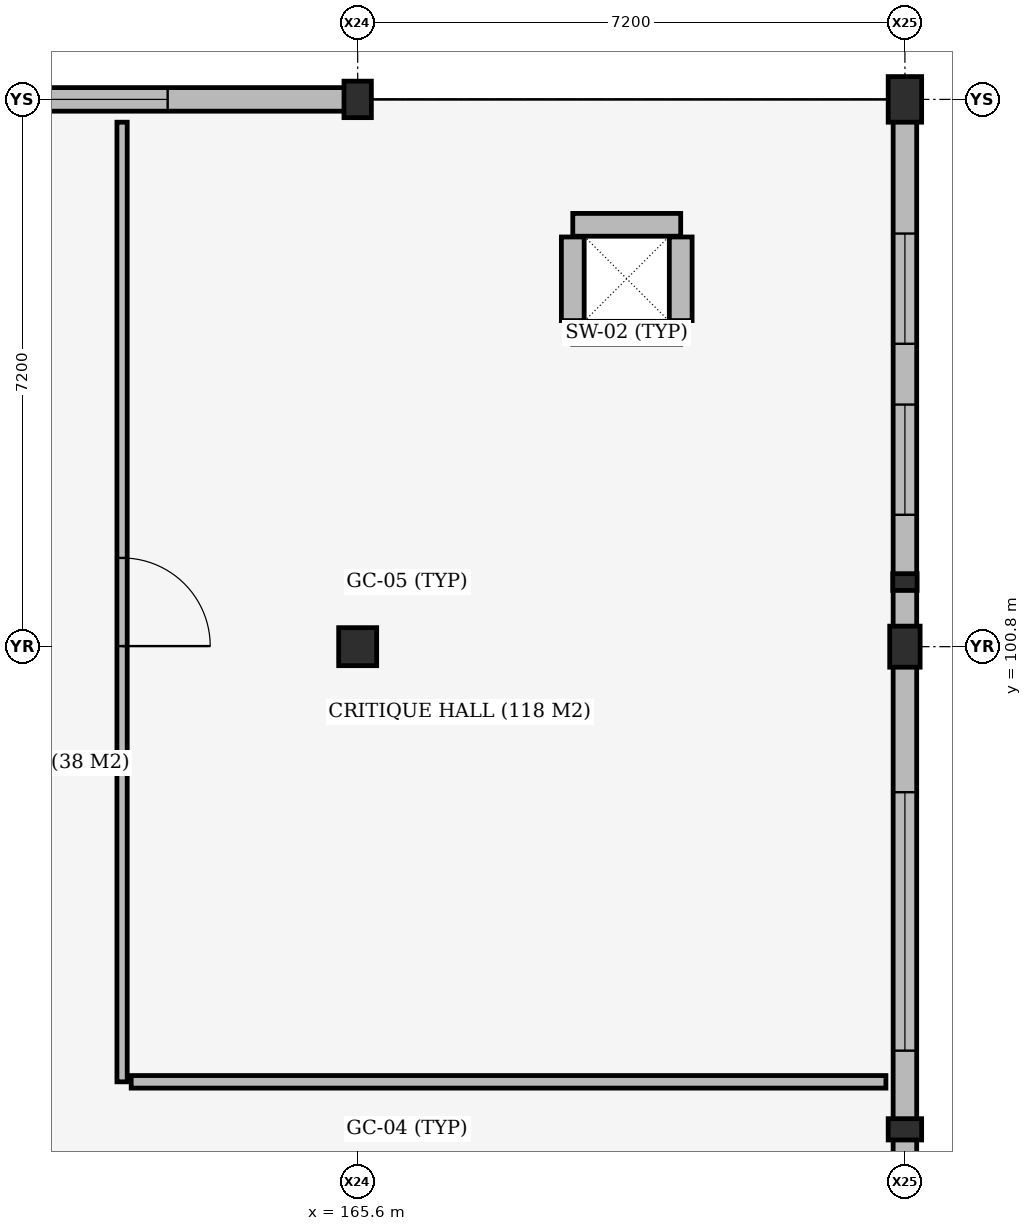
"""IFC4 building model, lengths in metres.
Left out: names, types, materials, properties, quantities, classifications, styles, units other than length and angle.
Written with IfcOpenShell. Run it as: python <this file> out.ifc"""

import sys

from ifc_helpers import new_model, si_unit, direction, frame, frame_2d, origin, origin_2d, place, context, subcontext, project, spatial, rectangle, extrude, element, fill, save


model = new_model("IFC4")
c1 = context("Model", 3, precision=1e-05, world=origin(), true_north=direction((0.0, 1.0)))
c2 = subcontext(c1, "Body", "Model", "MODEL_VIEW")
j1 = project(units=[si_unit("LENGTHUNIT", "METRE"), si_unit("PLANEANGLEUNIT", "RADIAN")], contexts=[c1])
p1 = place(None, origin())
s1 = spatial("IfcSite", under=j1, at=p1, CompositionType="ELEMENT")
p2 = place(p1, origin())
s2 = spatial("IfcBuilding", under=s1, at=p2, CompositionType="ELEMENT")
p3 = place(p2, frame((0.0, 0.0, 9.6)))
s3 = spatial("IfcBuildingStorey", under=s2, at=p3, CompositionType="ELEMENT", Elevation=9.6)
p4 = place(p3, frame((168.43, 104.93, 0.0), z_axis=(0.0, 0.0, 1.0), x_axis=(1.0, 0.0, 0.0)))
e1 = element("IfcWall", 1, at=p4, inside=s3, PredefinedType="SHEAR", context=c2, shape_type="SweptSolid", body=[
    extrude(rectangle(XDim=1.42, YDim=0.3, at=frame_2d((0.71, 0.0))), origin(), (0.0, 0.0, 1.0), 3.96),
])
p5 = place(p3, frame((169.85, 105.09, 0.0), z_axis=(0.0, 0.0, 1.0), x_axis=(0.0, 1.0, 0.0)))
e2 = element("IfcWall", 2, at=p5, inside=s3, PredefinedType="SHEAR", context=c2, shape_type="SweptSolid", body=[
    extrude(rectangle(XDim=1.1, YDim=0.3, at=frame_2d((0.55, 0.0))), origin(), (0.0, 0.0, 1.0), 3.96),
])
p6 = place(p3, frame((169.85, 106.35, 0.0), z_axis=(0.0, 0.0, 1.0), x_axis=(-1.0, 0.0, 0.0)))
e3 = element("IfcWall", 3, at=p6, inside=s3, PredefinedType="SHEAR", context=c2, shape_type="SweptSolid", body=[
    extrude(rectangle(XDim=1.42, YDim=0.3, at=frame_2d((0.71, 0.0))), origin(), (0.0, 0.0, 1.0), 3.96),
])
p7 = place(p3, frame((168.43, 106.19, 0.0), z_axis=(0.0, 0.0, 1.0), x_axis=(0.0, -1.0, 0.0)))
e4 = element("IfcWall", 4, at=p7, inside=s3, PredefinedType="SHEAR", context=c2, shape_type="SweptSolid", body=[
    extrude(rectangle(XDim=1.1, YDim=0.3, at=frame_2d((0.55, 0.0))), origin(), (0.0, 0.0, 1.0), 3.96),
])
p8 = place(p3, frame((165.6, 100.8, 0.0), z_axis=(0.0, 0.0, 1.0), x_axis=(1.0, 0.0, 0.0)))
e5 = element("IfcColumn", 5, at=p8, inside=s3, PredefinedType="COLUMN", context=c2, shape_type="SweptSolid", body=[
    extrude(rectangle(XDim=0.5, YDim=0.5, at=origin_2d()), origin(), (0.0, 0.0, 1.0), 3.92),
])
p9 = place(p3, frame((165.6, 108.0, 0.0), z_axis=(0.0, 0.0, 1.0), x_axis=(1.0, 0.0, 0.0)))
e6 = element("IfcColumn", 6, at=p9, inside=s3, PredefinedType="COLUMN", context=c2, shape_type="SweptSolid", body=[
    extrude(rectangle(XDim=0.36, YDim=0.48, at=origin_2d()), origin(), (0.0, 0.0, 1.0), 3.96),
])
p10 = place(p3, frame((172.8, 100.8, 0.0), z_axis=(0.0, 0.0, 1.0), x_axis=(1.0, 0.0, 0.0)))
e7 = element("IfcColumn", 7, at=p10, inside=s3, PredefinedType="COLUMN", context=c2, shape_type="SweptSolid", body=[
    extrude(rectangle(XDim=0.4, YDim=0.54, at=origin_2d()), origin(), (0.0, 0.0, 1.0), 3.92),
])
p11 = place(p3, frame((172.8, 108.0, 0.0), z_axis=(0.0, 0.0, 1.0), x_axis=(1.0, 0.0, 0.0)))
e8 = element("IfcColumn", 8, at=p11, inside=s3, PredefinedType="COLUMN", context=c2, shape_type="SweptSolid", body=[
    extrude(rectangle(XDim=0.44, YDim=0.6, at=origin_2d()), origin(), (0.0, 0.0, 1.0), 3.96),
])
p12 = place(p3, frame((172.8, 94.45, 0.0), z_axis=(0.0, 0.0, 1.0), x_axis=(1.0, 0.0, 0.0)))
e9 = element("IfcColumn", 9, at=p12, inside=s3, PredefinedType="PILASTER", context=c2, shape_type="SweptSolid", body=[
    extrude(rectangle(XDim=0.44, YDim=0.28, at=origin_2d()), origin(), (0.0, 0.0, 1.0), 3.92),
])
p13 = place(p3, frame((172.8, 101.65, 0.0), z_axis=(0.0, 0.0, 1.0), x_axis=(1.0, 0.0, 0.0)))
e10 = element("IfcColumn", 10, at=p13, inside=s3, PredefinedType="PILASTER", context=c2, shape_type="SweptSolid", body=[
    extrude(rectangle(XDim=0.32, YDim=0.22, at=origin_2d()), origin(), (0.0, 0.0, 1.0), 3.92),
])
p14 = place(p3, frame((158.622, 108.0, 0.0), z_axis=(0.0, 0.0, 1.0), x_axis=(1.0, 0.0, 0.0)))
e11 = element("IfcWall", 11, at=p14, inside=s3, PredefinedType="STANDARD", context=c2, shape_type="SweptSolid", body=[
    extrude(rectangle(XDim=6.806, YDim=0.31, at=frame_2d((3.403, 0.0))), origin(), (0.0, 0.0, 1.0), 3.92),
])
p15 = place(p14, frame((2.328, 0.0, 0.85)))
e12 = element("IfcOpeningElement", 12, at=p15, cuts=e11, PredefinedType="OPENING", context=c2, shape_type="SweptSolid", body=[
    extrude(rectangle(XDim=2.15, YDim=2.7, at=frame_2d((1.075, 1.35))), frame((0.0, 0.165, 0.0), z_axis=(0.0, -1.0, 0.0), x_axis=(1.0, 0.0, 0.0)), (0.0, 0.0, 1.0), 0.33),
])
p16 = place(p3, frame((172.8, 100.538, 0.0), z_axis=(0.0, 0.0, 1.0), x_axis=(0.0, -1.0, 0.0)))
e13 = element("IfcWall", 13, at=p16, inside=s3, PredefinedType="STANDARD", context=c2, shape_type="SweptSolid", body=[
    extrude(rectangle(XDim=6.706, YDim=0.31, at=frame_2d((3.353, 0.0))), origin(), (0.0, 0.0, 1.0), 3.24),
])
p17 = place(p16, frame((1.653, 0.0, 0.9)))
e14 = element("IfcOpeningElement", 14, at=p17, cuts=e13, PredefinedType="OPENING", context=c2, shape_type="SweptSolid", body=[
    extrude(rectangle(XDim=3.4, YDim=1.5, at=frame_2d((1.7, 0.75))), frame((0.0, 0.165, 0.0), z_axis=(0.0, -1.0, 0.0), x_axis=(1.0, 0.0, 0.0)), (0.0, 0.0, 1.0), 0.33),
])
p18 = place(p3, frame((172.8, 107.708, 0.0), z_axis=(0.0, 0.0, 1.0), x_axis=(0.0, -1.0, 0.0)))
e15 = element("IfcWall", 15, at=p18, inside=s3, PredefinedType="STANDARD", context=c2, shape_type="SweptSolid", body=[
    extrude(rectangle(XDim=6.646, YDim=0.31, at=frame_2d((3.323, 0.0))), origin(), (0.0, 0.0, 1.0), 3.92),
])
p19 = place(p18, frame((1.473, 0.0, 0.9)))
e16 = element("IfcOpeningElement", 16, at=p19, cuts=e15, PredefinedType="OPENING", context=c2, shape_type="SweptSolid", body=[
    extrude(rectangle(XDim=1.45, YDim=2.35, at=frame_2d((0.725, 1.175))), frame((0.0, 0.165, 0.0), z_axis=(0.0, -1.0, 0.0), x_axis=(1.0, 0.0, 0.0)), (0.0, 0.0, 1.0), 0.33),
])
p20 = place(p18, frame((3.723, 0.0, 0.9)))
e17 = element("IfcOpeningElement", 17, at=p20, cuts=e15, PredefinedType="OPENING", context=c2, shape_type="SweptSolid", body=[
    extrude(rectangle(XDim=1.45, YDim=2.35, at=frame_2d((0.725, 1.175))), frame((0.0, 0.165, 0.0), z_axis=(0.0, -1.0, 0.0), x_axis=(1.0, 0.0, 0.0)), (0.0, 0.0, 1.0), 0.33),
])
p21 = place(p3, frame((172.68, 101.35, 4.2), z_axis=(0.0, 0.0, 1.0), x_axis=(0.0, 1.0, 0.0)))
e18 = element("IfcWall", 18, at=p21, inside=s3, PredefinedType="PARAPET", context=c2, shape_type="SweptSolid", body=[
    extrude(rectangle(XDim=6.53, YDim=0.215, at=frame_2d((3.265, 0.0))), origin(), (0.0, 0.0, 1.0), 0.85),
])
p22 = place(p3, frame((172.68, 107.88, 4.2), z_axis=(0.0, 0.0, 1.0), x_axis=(-1.0, 0.0, 0.0)))
e19 = element("IfcWall", 19, at=p22, inside=s3, PredefinedType="PARAPET", context=c2, shape_type="SweptSolid", body=[
    extrude(rectangle(XDim=50.16, YDim=0.215, at=frame_2d((25.08, 0.0))), origin(), (0.0, 0.0, 1.0), 0.85),
])
p23 = place(p3, frame((162.62, 95.075, 0.0), z_axis=(0.0, 0.0, 1.0), x_axis=(1.0, 0.0, 0.0)))
e20 = element("IfcWall", 20, at=p23, inside=s3, PredefinedType="PARTITIONING", context=c2, shape_type="SweptSolid", body=[
    extrude(rectangle(XDim=9.93, YDim=0.165, at=frame_2d((4.965, 0.0))), origin(), (0.0, 0.0, 1.0), 3.4),
])
p24 = place(p3, frame((162.5, 95.075, 0.0), z_axis=(0.0, 0.0, 1.0), x_axis=(0.0, 1.0, 0.0)))
e21 = element("IfcWall", 21, at=p24, inside=s3, PredefinedType="PARTITIONING", context=c2, shape_type="SweptSolid", body=[
    extrude(rectangle(XDim=12.625, YDim=0.135, at=frame_2d((6.312, 0.0))), origin(), (0.0, 0.0, 1.0), 3.24),
])
p25 = place(p24, frame((5.732, 0.0, 0.0)))
e22 = element("IfcOpeningElement", 22, at=p25, cuts=e21, PredefinedType="OPENING", context=c2, shape_type="SweptSolid", body=[
    extrude(rectangle(XDim=1.16, YDim=2.2, at=frame_2d((0.58, 1.1))), frame((0.0, 0.077, 0.0), z_axis=(0.0, -1.0, 0.0), x_axis=(1.0, 0.0, 0.0)), (0.0, 0.0, 1.0), 0.155),
])
p26 = place(p15, origin())
e23 = element("IfcWindow", 23, at=p26, inside=s3, PartitioningType="DOUBLE_PANEL_VERTICAL", PredefinedType="WINDOW", context=c2, shape_type="SweptSolid", body=[
    extrude(rectangle(XDim=2.15, YDim=2.7, at=frame_2d((1.075, 1.35))), frame((0.0, 0.03, 0.0), z_axis=(0.0, -1.0, 0.0), x_axis=(1.0, 0.0, 0.0)), (0.0, 0.0, 1.0), 0.06),
])
fill(e12, e23)
p27 = place(p17, origin())
e24 = element("IfcWindow", 24, at=p27, inside=s3, PartitioningType="DOUBLE_PANEL_VERTICAL", PredefinedType="WINDOW", context=c2, shape_type="SweptSolid", body=[
    extrude(rectangle(XDim=3.4, YDim=1.5, at=frame_2d((1.7, 0.75))), frame((0.0, 0.03, 0.0), z_axis=(0.0, -1.0, 0.0), x_axis=(1.0, 0.0, 0.0)), (0.0, 0.0, 1.0), 0.06),
])
fill(e14, e24)
p28 = place(p19, origin())
e25 = element("IfcWindow", 25, at=p28, inside=s3, PartitioningType="DOUBLE_PANEL_VERTICAL", PredefinedType="WINDOW", context=c2, shape_type="SweptSolid", body=[
    extrude(rectangle(XDim=1.45, YDim=2.35, at=frame_2d((0.725, 1.175))), frame((0.0, 0.03, 0.0), z_axis=(0.0, -1.0, 0.0), x_axis=(1.0, 0.0, 0.0)), (0.0, 0.0, 1.0), 0.06),
])
fill(e16, e25)
p29 = place(p20, origin())
e26 = element("IfcWindow", 26, at=p29, inside=s3, PartitioningType="DOUBLE_PANEL_VERTICAL", PredefinedType="WINDOW", context=c2, shape_type="SweptSolid", body=[
    extrude(rectangle(XDim=1.45, YDim=2.35, at=frame_2d((0.725, 1.175))), frame((0.0, 0.03, 0.0), z_axis=(0.0, -1.0, 0.0), x_axis=(1.0, 0.0, 0.0)), (0.0, 0.0, 1.0), 0.06),
])
fill(e17, e26)
p30 = place(p25, origin())
e27 = element("IfcDoor", 27, at=p30, inside=s3, OperationType="SINGLE_SWING_RIGHT", PredefinedType="DOOR", context=c2, shape_type="SweptSolid", body=[
    extrude(rectangle(XDim=1.16, YDim=2.2, at=frame_2d((0.58, 1.1))), frame((0.0, 0.025, 0.0), z_axis=(0.0, -1.0, 0.0), x_axis=(1.0, 0.0, 0.0)), (0.0, 0.0, 1.0), 0.05),
])
fill(e22, e27)
save(model, sys.argv[1])
